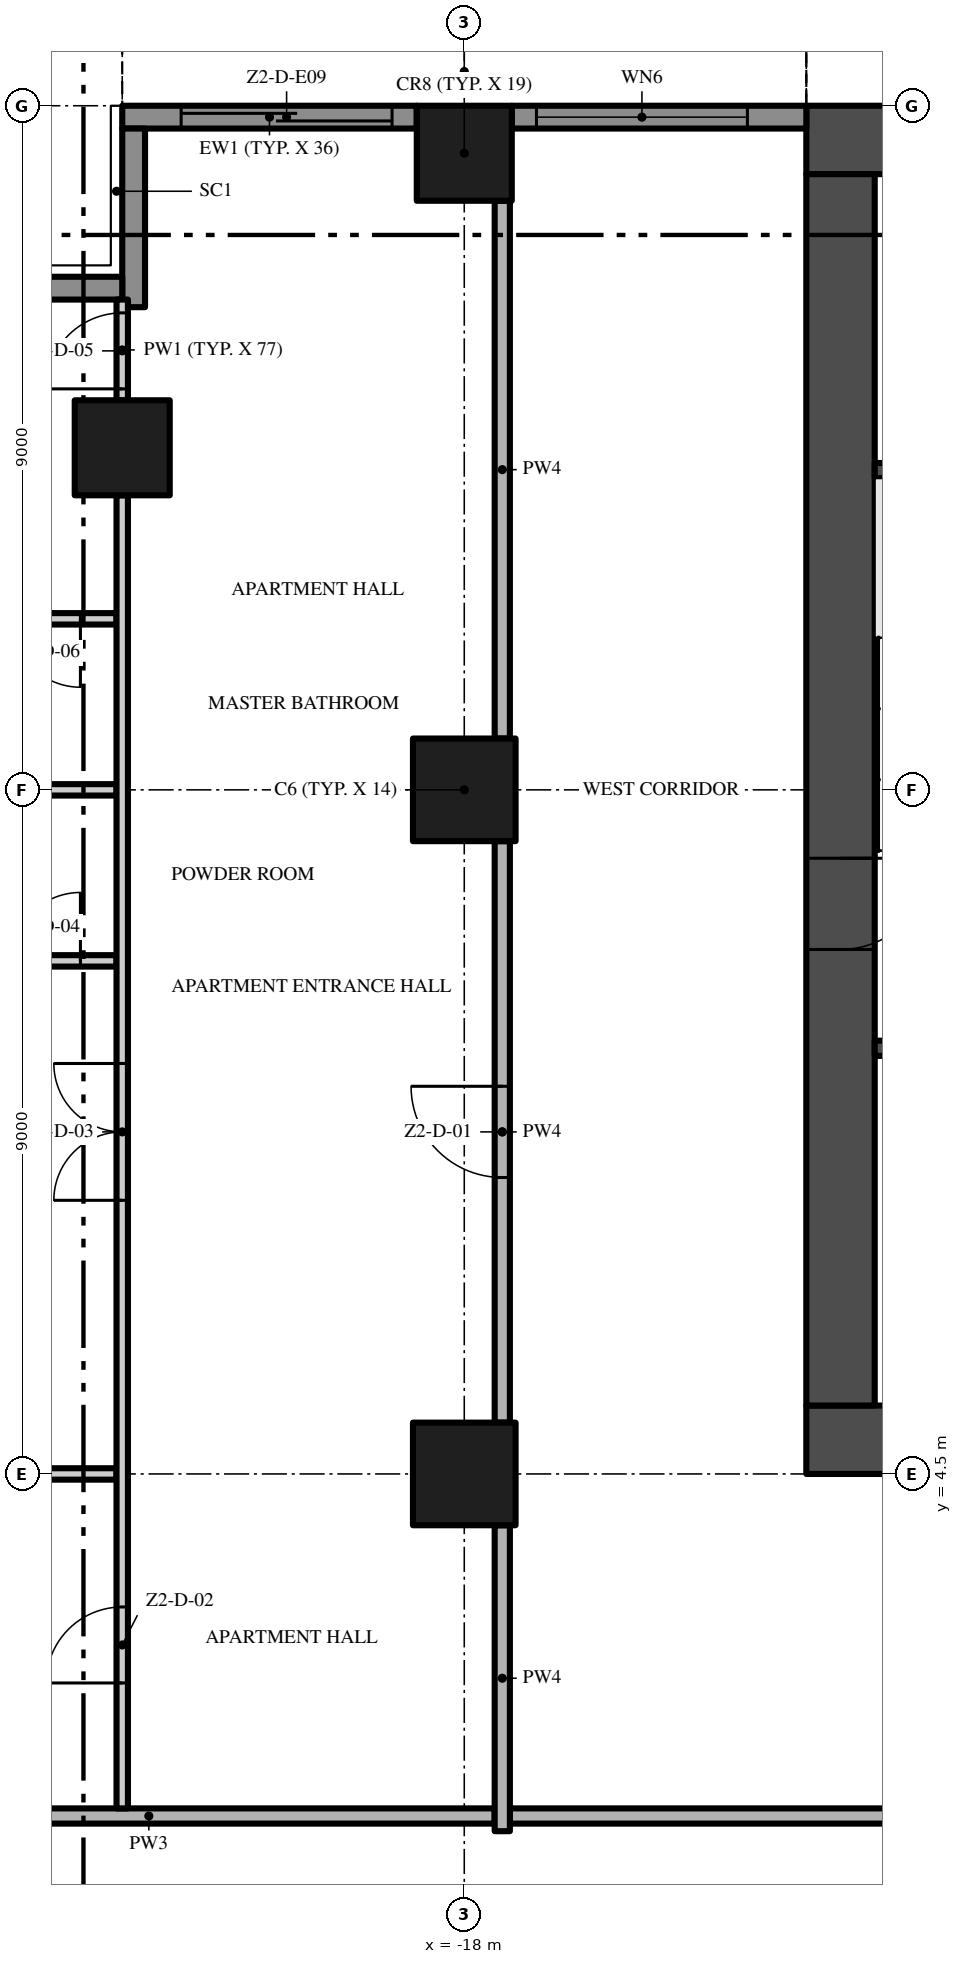
"""IFC4 building model, lengths in metres.
Left out: names, types, materials, properties, quantities, classifications, styles, units other than length and angle.
Written with IfcOpenShell. Run it as: python <this file> out.ifc"""

import sys

from ifc_helpers import new_model, si_unit, direction, frame, frame_2d, origin, origin_2d, place, context, subcontext, project, spatial, rectangle, extrude, element, fill, save


model = new_model("IFC4")
c1 = context("Model", 3, precision=1e-05, world=origin(), true_north=direction((0.0, 1.0)))
c2 = subcontext(c1, "Body", "Model", "MODEL_VIEW")
j1 = project(units=[si_unit("LENGTHUNIT", "METRE"), si_unit("PLANEANGLEUNIT", "RADIAN")], contexts=[c1])
p1 = place(None, origin())
s1 = spatial("IfcSite", under=j1, at=p1, CompositionType="ELEMENT")
p2 = place(p1, origin())
s2 = spatial("IfcBuilding", under=s1, at=p2, CompositionType="ELEMENT")
p3 = place(p2, frame((0.0, 0.0, 103.6)))
s3 = spatial("IfcBuildingStorey", under=s2, at=p3, CompositionType="ELEMENT", Elevation=103.6)
p4 = place(p3, frame((-13.5, 4.95, -0.3), z_axis=(0.0, 0.0, 1.0), x_axis=(1.0, 0.0, 0.0)))
e1 = element("IfcWall", 1, at=p4, inside=s3, PredefinedType="SHEAR", context=c2, shape_type="SweptSolid", body=[
    extrude(rectangle(XDim=27.0, YDim=0.9, at=frame_2d((13.5, 0.0))), origin(), (0.0, 0.0, 1.0), 3.8),
])
p5 = place(p4, frame((12.0, 0.0, 0.3)))
e2 = element("IfcOpeningElement", 2, at=p5, cuts=e1, PredefinedType="OPENING", context=c2, shape_type="SweptSolid", body=[
    extrude(rectangle(XDim=3.0, YDim=2.4, at=frame_2d((1.5, 1.2))), frame((0.0, 0.46, 0.0), z_axis=(0.0, -1.0, 0.0), x_axis=(1.0, 0.0, 0.0)), (0.0, 0.0, 1.0), 0.92),
])
p6 = place(p4, frame((4.9, 0.0, 0.3)))
e3 = element("IfcOpeningElement", 3, at=p6, cuts=e1, PredefinedType="OPENING", context=c2, shape_type="SweptSolid", body=[
    extrude(rectangle(XDim=1.2, YDim=2.2, at=frame_2d((0.6, 1.1))), frame((0.0, 0.46, 0.0), z_axis=(0.0, -1.0, 0.0), x_axis=(1.0, 0.0, 0.0)), (0.0, 0.0, 1.0), 0.92),
])
p7 = place(p4, frame((20.75, 0.0, 0.3)))
e4 = element("IfcOpeningElement", 4, at=p7, cuts=e1, PredefinedType="OPENING", context=c2, shape_type="SweptSolid", body=[
    extrude(rectangle(XDim=1.5, YDim=2.2, at=frame_2d((0.75, 1.1))), frame((0.0, 0.46, 0.0), z_axis=(0.0, -1.0, 0.0), x_axis=(1.0, 0.0, 0.0)), (0.0, 0.0, 1.0), 0.92),
])
p8 = place(p4, frame((17.4, 0.0, 0.3)))
e5 = element("IfcOpeningElement", 5, at=p8, cuts=e1, PredefinedType="OPENING", context=c2, shape_type="SweptSolid", body=[
    extrude(rectangle(XDim=1.2, YDim=2.2, at=frame_2d((0.6, 1.1))), frame((0.0, 0.46, 0.0), z_axis=(0.0, -1.0, 0.0), x_axis=(1.0, 0.0, 0.0)), (0.0, 0.0, 1.0), 0.92),
])
p9 = place(p3, frame((13.5, 22.05, -0.3), z_axis=(0.0, 0.0, 1.0), x_axis=(-1.0, 0.0, 0.0)))
e6 = element("IfcWall", 6, at=p9, inside=s3, PredefinedType="SHEAR", context=c2, shape_type="SweptSolid", body=[
    extrude(rectangle(XDim=27.0, YDim=0.9, at=frame_2d((13.5, 0.0))), origin(), (0.0, 0.0, 1.0), 3.8),
])
p10 = place(p3, frame((-13.05, 21.6, -0.3), z_axis=(0.0, 0.0, 1.0), x_axis=(0.0, -1.0, 0.0)))
e7 = element("IfcWall", 7, at=p10, inside=s3, PredefinedType="SHEAR", context=c2, shape_type="SweptSolid", body=[
    extrude(rectangle(XDim=16.2, YDim=0.9, at=frame_2d((8.1, 0.0))), origin(), (0.0, 0.0, 1.0), 3.8),
])
p11 = place(p10, frame((9.0, 0.0, 0.3)))
e8 = element("IfcOpeningElement", 8, at=p11, cuts=e7, PredefinedType="OPENING", context=c2, shape_type="SweptSolid", body=[
    extrude(rectangle(XDim=1.2, YDim=2.2, at=frame_2d((0.6, 1.1))), frame((0.0, 0.46, 0.0), z_axis=(0.0, -1.0, 0.0), x_axis=(1.0, 0.0, 0.0)), (0.0, 0.0, 1.0), 0.92),
])
p12 = place(p3, frame((-18.0, 13.5, 0.0), z_axis=(0.0, 0.0, 1.0), x_axis=(1.0, 0.0, 0.0)))
e9 = element("IfcColumn", 9, at=p12, inside=s3, PredefinedType="COLUMN", context=c2, shape_type="SweptSolid", body=[
    extrude(rectangle(XDim=1.35, YDim=1.35, at=origin_2d()), origin(), (0.0, 0.0, 1.0), 3.5),
])
p13 = place(p3, frame((-18.0, 21.875, 0.0), z_axis=(0.0, 0.0, 1.0), x_axis=(1.0, 0.0, 0.0)))
e10 = element("IfcColumn", 10, at=p13, inside=s3, PredefinedType="COLUMN", context=c2, shape_type="SweptSolid", body=[
    extrude(rectangle(XDim=1.25, YDim=1.25, at=origin_2d()), origin(), (0.0, 0.0, 1.0), 3.5),
])
p14 = place(p3, frame((-18.0, 4.5, 0.0), z_axis=(0.0, 0.0, 1.0), x_axis=(1.0, 0.0, 0.0)))
e11 = element("IfcColumn", 11, at=p14, inside=s3, PredefinedType="COLUMN", context=c2, shape_type="SweptSolid", body=[
    extrude(rectangle(XDim=1.35, YDim=1.35, at=origin_2d()), origin(), (0.0, 0.0, 1.0), 3.5),
])
p15 = place(p3, frame((-22.5, 18.0, 0.0), z_axis=(0.0, 0.0, 1.0), x_axis=(1.0, 0.0, 0.0)))
e12 = element("IfcColumn", 12, at=p15, inside=s3, PredefinedType="COLUMN", context=c2, shape_type="SweptSolid", body=[
    extrude(rectangle(XDim=1.25, YDim=1.25, at=origin_2d()), origin(), (0.0, 0.0, 1.0), 3.5),
])
p16 = place(p3, frame((-17.375, 22.35, 0.0), z_axis=(0.0, 0.0, 1.0), x_axis=(1.0, 0.0, 0.0)))
e13 = element("IfcWall", 13, at=p16, inside=s3, PredefinedType="SOLIDWALL", context=c2, shape_type="SweptSolid", body=[
    extrude(rectangle(XDim=3.875, YDim=0.3, at=frame_2d((1.938, 0.0))), origin(), (0.0, 0.0, 1.0), 3.5),
])
p17 = place(p16, frame((0.325, 0.0, 0.45)))
e14 = element("IfcOpeningElement", 14, at=p17, cuts=e13, PredefinedType="OPENING", context=c2, shape_type="SweptSolid", body=[
    extrude(rectangle(XDim=2.775, YDim=2.65, at=frame_2d((1.387, 1.325))), frame((0.0, 0.16, 0.0), z_axis=(0.0, -1.0, 0.0), x_axis=(1.0, 0.0, 0.0)), (0.0, 0.0, 1.0), 0.32),
])
p18 = place(p3, frame((-22.5, 22.35, 0.0), z_axis=(0.0, 0.0, 1.0), x_axis=(1.0, 0.0, 0.0)))
e15 = element("IfcWall", 15, at=p18, inside=s3, PredefinedType="SOLIDWALL", context=c2, shape_type="SweptSolid", body=[
    extrude(rectangle(XDim=3.875, YDim=0.3, at=frame_2d((1.938, 0.0))), origin(), (0.0, 0.0, 1.0), 3.5),
])
p19 = place(p18, frame((0.775, 0.0, 0.0)))
e16 = element("IfcOpeningElement", 16, at=p19, cuts=e15, PredefinedType="OPENING", context=c2, shape_type="SweptSolid", body=[
    extrude(rectangle(XDim=2.775, YDim=2.4, at=frame_2d((1.387, 1.2))), frame((0.0, 0.16, 0.0), z_axis=(0.0, -1.0, 0.0), x_axis=(1.0, 0.0, 0.0)), (0.0, 0.0, 1.0), 0.32),
])
p20 = place(p3, frame((-22.35, 19.85, 0.0), z_axis=(0.0, 0.0, 1.0), x_axis=(0.0, 1.0, 0.0)))
e17 = element("IfcWall", 17, at=p20, inside=s3, PredefinedType="SOLIDWALL", context=c2, shape_type="SweptSolid", body=[
    extrude(rectangle(XDim=2.35, YDim=0.3, at=frame_2d((1.175, 0.0))), origin(), (0.0, 0.0, 1.0), 3.5),
])
p21 = place(p3, frame((-24.75, 20.1, 0.0), z_axis=(0.0, 0.0, 1.0), x_axis=(1.0, 0.0, 0.0)))
e18 = element("IfcWall", 18, at=p21, inside=s3, PredefinedType="SOLIDWALL", context=c2, shape_type="SweptSolid", body=[
    extrude(rectangle(XDim=2.25, YDim=0.3, at=frame_2d((1.125, 0.0))), origin(), (0.0, 0.0, 1.0), 3.5),
])
for number, where, z_axis, x_axis in (
    (19, (-12.6, 10.1, 0.0), (0.0, 0.0, 1.0), (1.0, 0.0, 0.0)),
    (20, (-12.6, 17.7, 0.0), (0.0, 0.0, 1.0), (1.0, 0.0, 0.0)),
):
    element("IfcWall", number, at=place(p3, frame(where, z_axis=z_axis, x_axis=x_axis)), inside=s3, PredefinedType="SHEAR", context=c2, shape_type="SweptSolid", body=[
        extrude(rectangle(XDim=2.95, YDim=0.2, at=frame_2d((1.475, 0.0))), origin(), (0.0, 0.0, 1.0), 3.5),
    ])
p22 = place(p3, frame((-0.1, 0.0, 0.0), z_axis=(0.0, 0.0, 1.0), x_axis=(-1.0, 0.0, 0.0)))
e21 = element("IfcWall", 21, at=p22, inside=s3, PredefinedType="PARTITIONING", context=c2, shape_type="SweptSolid", body=[
    extrude(rectangle(XDim=17.3, YDim=0.2, at=frame_2d((8.65, 0.0))), origin(), (0.0, 0.0, 1.0), 3.5),
])
p23 = place(p22, frame((8.15, 0.0, 0.0)))
e22 = element("IfcOpeningElement", 22, at=p23, cuts=e21, PredefinedType="OPENING", context=c2, shape_type="SweptSolid", body=[
    extrude(rectangle(XDim=1.5, YDim=2.4, at=frame_2d((0.75, 1.2))), frame((0.0, 0.11, 0.0), z_axis=(0.0, -1.0, 0.0), x_axis=(1.0, 0.0, 0.0)), (0.0, 0.0, 1.0), 0.22),
])
p24 = place(p3, frame((-26.7, 0.0, 0.0), z_axis=(0.0, 0.0, 1.0), x_axis=(1.0, 0.0, 0.0)))
e23 = element("IfcWall", 23, at=p24, inside=s3, PredefinedType="PARTITIONING", context=c2, shape_type="SweptSolid", body=[
    extrude(rectangle(XDim=9.1, YDim=0.2, at=frame_2d((4.55, 0.0))), origin(), (0.0, 0.0, 1.0), 3.5),
])
p25 = place(p3, frame((-25.75, 4.5, 0.0), z_axis=(0.0, 0.0, 1.0), x_axis=(1.0, 0.0, 0.0)))
e24 = element("IfcWall", 24, at=p25, inside=s3, PredefinedType="PARTITIONING", context=c2, shape_type="SweptSolid", body=[
    extrude(rectangle(XDim=3.175, YDim=0.15, at=frame_2d((1.587, 0.0))), origin(), (0.0, 0.0, 1.0), 3.5),
])
p26 = place(p3, frame((-24.45, 11.25, 0.0), z_axis=(0.0, 0.0, 1.0), x_axis=(1.0, 0.0, 0.0)))
e25 = element("IfcWall", 25, at=p26, inside=s3, PredefinedType="PARTITIONING", context=c2, shape_type="SweptSolid", body=[
    extrude(rectangle(XDim=1.875, YDim=0.15, at=frame_2d((0.938, 0.0))), origin(), (0.0, 0.0, 1.0), 3.5),
])
p27 = place(p26, frame((0.5, 0.0, 0.0)))
e26 = element("IfcOpeningElement", 26, at=p27, cuts=e25, PredefinedType="OPENING", context=c2, shape_type="SweptSolid", body=[
    extrude(rectangle(XDim=0.9, YDim=2.1, at=frame_2d((0.45, 1.05))), frame((0.0, 0.085, 0.0), z_axis=(0.0, -1.0, 0.0), x_axis=(1.0, 0.0, 0.0)), (0.0, 0.0, 1.0), 0.17),
])
p28 = place(p3, frame((-24.45, 13.5, 0.0), z_axis=(0.0, 0.0, 1.0), x_axis=(1.0, 0.0, 0.0)))
e27 = element("IfcWall", 27, at=p28, inside=s3, PredefinedType="PARTITIONING", context=c2, shape_type="SweptSolid", body=[
    extrude(rectangle(XDim=1.875, YDim=0.15, at=frame_2d((0.938, 0.0))), origin(), (0.0, 0.0, 1.0), 3.5),
])
p29 = place(p3, frame((-22.575, 15.75, 0.0), z_axis=(0.0, 0.0, 1.0), x_axis=(-1.0, 0.0, 0.0)))
e28 = element("IfcWall", 28, at=p29, inside=s3, PredefinedType="PARTITIONING", context=c2, shape_type="SweptSolid", body=[
    extrude(rectangle(XDim=1.875, YDim=0.15, at=frame_2d((0.938, 0.0))), origin(), (0.0, 0.0, 1.0), 3.5),
])
p30 = place(p29, frame((0.475, 0.0, 0.0)))
e29 = element("IfcOpeningElement", 29, at=p30, cuts=e28, PredefinedType="OPENING", context=c2, shape_type="SweptSolid", body=[
    extrude(rectangle(XDim=0.9, YDim=2.1, at=frame_2d((0.45, 1.05))), frame((0.0, 0.085, 0.0), z_axis=(0.0, -1.0, 0.0), x_axis=(1.0, 0.0, 0.0)), (0.0, 0.0, 1.0), 0.17),
])
p31 = place(p3, frame((-22.5, 0.1, 0.0), z_axis=(0.0, 0.0, 1.0), x_axis=(0.0, 1.0, 0.0)))
e30 = element("IfcWall", 30, at=p31, inside=s3, PredefinedType="PARTITIONING", context=c2, shape_type="SweptSolid", body=[
    extrude(rectangle(XDim=17.275, YDim=0.15, at=frame_2d((8.637, 0.0))), origin(), (0.0, 0.0, 1.0), 3.5),
])
p32 = place(p31, frame((1.65, 0.0, 0.0)))
e31 = element("IfcOpeningElement", 31, at=p32, cuts=e30, PredefinedType="OPENING", context=c2, shape_type="SweptSolid", body=[
    extrude(rectangle(XDim=1.0, YDim=2.4, at=frame_2d((0.5, 1.2))), frame((0.0, 0.085, 0.0), z_axis=(0.0, -1.0, 0.0), x_axis=(1.0, 0.0, 0.0)), (0.0, 0.0, 1.0), 0.17),
])
p33 = place(p31, frame((8.0, 0.0, 0.0)))
e32 = element("IfcOpeningElement", 32, at=p33, cuts=e30, PredefinedType="OPENING", context=c2, shape_type="SweptSolid", body=[
    extrude(rectangle(XDim=1.8, YDim=2.4, at=frame_2d((0.9, 1.2))), frame((0.0, 0.085, 0.0), z_axis=(0.0, -1.0, 0.0), x_axis=(1.0, 0.0, 0.0)), (0.0, 0.0, 1.0), 0.17),
])
p34 = place(p3, frame((-22.5, 18.625, 0.0), z_axis=(0.0, 0.0, 1.0), x_axis=(0.0, 1.0, 0.0)))
e33 = element("IfcWall", 33, at=p34, inside=s3, PredefinedType="PARTITIONING", context=c2, shape_type="SweptSolid", body=[
    extrude(rectangle(XDim=1.325, YDim=0.15, at=frame_2d((0.662, 0.0))), origin(), (0.0, 0.0, 1.0), 3.5),
])
p35 = place(p34, frame((0.15, 0.0, 0.0)))
e34 = element("IfcOpeningElement", 34, at=p35, cuts=e33, PredefinedType="OPENING", context=c2, shape_type="SweptSolid", body=[
    extrude(rectangle(XDim=1.0, YDim=2.4, at=frame_2d((0.5, 1.2))), frame((0.0, 0.085, 0.0), z_axis=(0.0, -1.0, 0.0), x_axis=(1.0, 0.0, 0.0)), (0.0, 0.0, 1.0), 0.17),
])
p36 = place(p3, frame((-17.5, -0.2, 0.0), z_axis=(0.0, 0.0, 1.0), x_axis=(0.0, 1.0, 0.0)))
e35 = element("IfcWall", 35, at=p36, inside=s3, PredefinedType="PARTITIONING", context=c2, shape_type="SweptSolid", body=[
    extrude(rectangle(XDim=4.025, YDim=0.2, at=frame_2d((2.013, 0.0))), origin(), (0.0, 0.0, 1.0), 3.5),
])
p37 = place(p3, frame((-17.5, 5.175, 0.0), z_axis=(0.0, 0.0, 1.0), x_axis=(0.0, 1.0, 0.0)))
e36 = element("IfcWall", 36, at=p37, inside=s3, PredefinedType="PARTITIONING", context=c2, shape_type="SweptSolid", body=[
    extrude(rectangle(XDim=7.65, YDim=0.2, at=frame_2d((3.825, 0.0))), origin(), (0.0, 0.0, 1.0), 3.5),
])
p38 = place(p37, frame((3.225, 0.0, 0.0)))
e37 = element("IfcOpeningElement", 37, at=p38, cuts=e36, PredefinedType="OPENING", context=c2, shape_type="SweptSolid", body=[
    extrude(rectangle(XDim=1.2, YDim=2.4, at=frame_2d((0.6, 1.2))), frame((0.0, 0.11, 0.0), z_axis=(0.0, -1.0, 0.0), x_axis=(1.0, 0.0, 0.0)), (0.0, 0.0, 1.0), 0.22),
])
p39 = place(p3, frame((-17.5, 14.175, 0.0), z_axis=(0.0, 0.0, 1.0), x_axis=(0.0, 1.0, 0.0)))
e38 = element("IfcWall", 38, at=p39, inside=s3, PredefinedType="PARTITIONING", context=c2, shape_type="SweptSolid", body=[
    extrude(rectangle(XDim=7.075, YDim=0.2, at=frame_2d((3.538, 0.0))), origin(), (0.0, 0.0, 1.0), 3.5),
])
p40 = place(p17, origin())
e39 = element("IfcWindow", 39, at=p40, inside=s3, PartitioningType="SINGLE_PANEL", PredefinedType="WINDOW", context=c2, shape_type="SweptSolid", body=[
    extrude(rectangle(XDim=2.775, YDim=2.65, at=frame_2d((1.387, 1.325))), frame((0.0, 0.03, 0.0), z_axis=(0.0, -1.0, 0.0), x_axis=(1.0, 0.0, 0.0)), (0.0, 0.0, 1.0), 0.06),
])
fill(e14, e39)
p41 = place(p19, origin())
e40 = element("IfcDoor", 40, at=p41, inside=s3, OperationType="SINGLE_SWING_LEFT", PredefinedType="DOOR", context=c2, shape_type="SweptSolid", body=[
    extrude(rectangle(XDim=2.775, YDim=2.4, at=frame_2d((1.387, 1.2))), frame((0.0, 0.025, 0.0), z_axis=(0.0, -1.0, 0.0), x_axis=(1.0, 0.0, 0.0)), (0.0, 0.0, 1.0), 0.05),
])
fill(e16, e40)
p42 = place(p11, frame((1.2, 0.0, 0.0), z_axis=(0.0, 0.0, 1.0), x_axis=(-1.0, 0.0, 0.0)))
e41 = element("IfcDoor", 41, at=p42, inside=s3, OperationType="SINGLE_SWING_RIGHT", PredefinedType="DOOR", context=c2, shape_type="SweptSolid", body=[
    extrude(rectangle(XDim=1.2, YDim=2.2, at=frame_2d((0.6, 1.1))), frame((0.0, 0.025, 0.0), z_axis=(0.0, -1.0, 0.0), x_axis=(1.0, 0.0, 0.0)), (0.0, 0.0, 1.0), 0.05),
])
fill(e8, e41)
p43 = place(p38, origin())
e42 = element("IfcDoor", 42, at=p43, inside=s3, OperationType="SINGLE_SWING_RIGHT", PredefinedType="DOOR", context=c2, shape_type="SweptSolid", body=[
    extrude(rectangle(XDim=1.2, YDim=2.4, at=frame_2d((0.6, 1.2))), frame((0.0, 0.025, 0.0), z_axis=(0.0, -1.0, 0.0), x_axis=(1.0, 0.0, 0.0)), (0.0, 0.0, 1.0), 0.05),
])
fill(e37, e42)
p44 = place(p32, origin())
e43 = element("IfcDoor", 43, at=p44, inside=s3, OperationType="SINGLE_SWING_LEFT", PredefinedType="DOOR", context=c2, shape_type="SweptSolid", body=[
    extrude(rectangle(XDim=1.0, YDim=2.4, at=frame_2d((0.5, 1.2))), frame((0.0, 0.025, 0.0), z_axis=(0.0, -1.0, 0.0), x_axis=(1.0, 0.0, 0.0)), (0.0, 0.0, 1.0), 0.05),
])
fill(e31, e43)
p45 = place(p33, origin())
e44 = element("IfcDoor", 44, at=p45, inside=s3, OperationType="DOUBLE_DOOR_SINGLE_SWING", PredefinedType="DOOR", context=c2, shape_type="SweptSolid", body=[
    extrude(rectangle(XDim=1.8, YDim=2.4, at=frame_2d((0.9, 1.2))), frame((0.0, 0.025, 0.0), z_axis=(0.0, -1.0, 0.0), x_axis=(1.0, 0.0, 0.0)), (0.0, 0.0, 1.0), 0.05),
])
fill(e32, e44)
p46 = place(p27, origin())
e45 = element("IfcDoor", 45, at=p46, inside=s3, OperationType="SINGLE_SWING_RIGHT", PredefinedType="DOOR", context=c2, shape_type="SweptSolid", body=[
    extrude(rectangle(XDim=0.9, YDim=2.1, at=frame_2d((0.45, 1.05))), frame((0.0, 0.025, 0.0), z_axis=(0.0, -1.0, 0.0), x_axis=(1.0, 0.0, 0.0)), (0.0, 0.0, 1.0), 0.05),
])
fill(e26, e45)
p47 = place(p35, origin())
e46 = element("IfcDoor", 46, at=p47, inside=s3, OperationType="SINGLE_SWING_LEFT", PredefinedType="DOOR", context=c2, shape_type="SweptSolid", body=[
    extrude(rectangle(XDim=1.0, YDim=2.4, at=frame_2d((0.5, 1.2))), frame((0.0, 0.025, 0.0), z_axis=(0.0, -1.0, 0.0), x_axis=(1.0, 0.0, 0.0)), (0.0, 0.0, 1.0), 0.05),
])
fill(e34, e46)
p48 = place(p30, origin())
e47 = element("IfcDoor", 47, at=p48, inside=s3, OperationType="SINGLE_SWING_LEFT", PredefinedType="DOOR", context=c2, shape_type="SweptSolid", body=[
    extrude(rectangle(XDim=0.9, YDim=2.1, at=frame_2d((0.45, 1.05))), frame((0.0, 0.025, 0.0), z_axis=(0.0, -1.0, 0.0), x_axis=(1.0, 0.0, 0.0)), (0.0, 0.0, 1.0), 0.05),
])
fill(e29, e47)
save(model, sys.argv[1])
